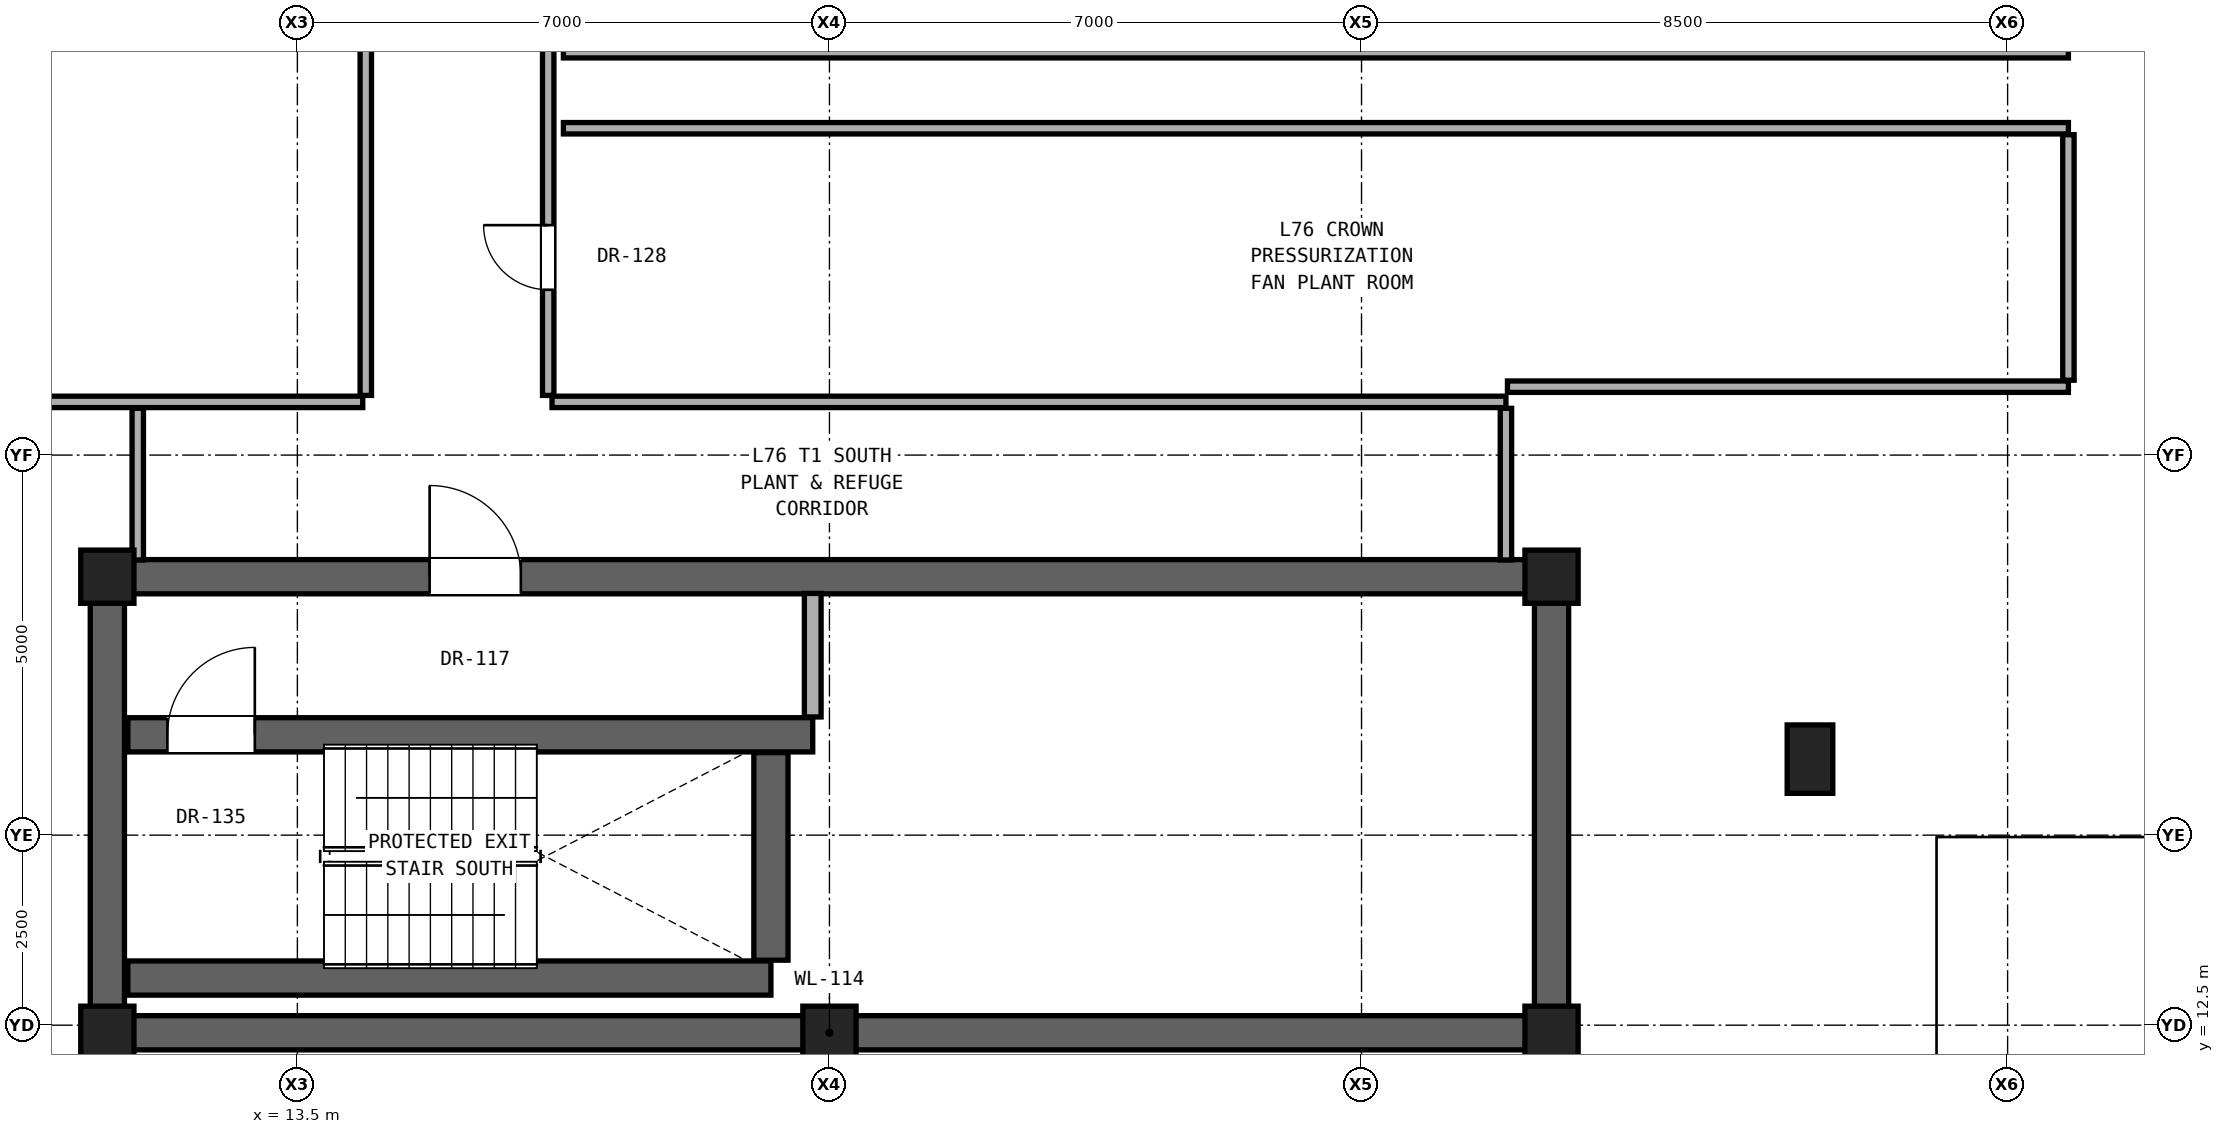
"""IFC4 building model, lengths in metres.
Left out: names, types, materials, properties, quantities, classifications, styles, units other than length and angle.
Written with IfcOpenShell. Run it as: python <this file> out.ifc"""

import sys

from ifc_helpers import new_model, si_unit, direction, frame, frame_2d, origin, origin_2d, place, context, subcontext, project, spatial, rectangle, extrude, element, fill, save


model = new_model("IFC4")
c1 = context("Model", 3, precision=1e-05, world=origin(), true_north=direction((0.0, 1.0)))
c2 = subcontext(c1, "Body", "Model", "MODEL_VIEW")
j1 = project(units=[si_unit("LENGTHUNIT", "METRE"), si_unit("PLANEANGLEUNIT", "RADIAN")], contexts=[c1])
p1 = place(None, origin())
s1 = spatial("IfcSite", under=j1, at=p1, CompositionType="ELEMENT")
p2 = place(p1, origin())
s2 = spatial("IfcBuilding", under=s1, at=p2, CompositionType="ELEMENT")
p3 = place(p2, frame((0.0, 0.0, 266.1)))
s3 = spatial("IfcBuildingStorey", under=s2, at=p3, CompositionType="ELEMENT", Elevation=266.1)
for number, where, z_axis, x_axis in (
    (1, (11.0, 12.4, 0.0), (0.0, 0.0, 1.0), (1.0, 0.0, 0.0)),
    (2, (20.5, 12.4, 0.0), (0.0, 0.0, 1.0), (1.0, 0.0, 0.0)),
    (3, (30.0, 12.4, 0.0), (0.0, 0.0, 1.0), (1.0, 0.0, 0.0)),
    (4, (11.0, 18.4, 0.0), (0.0, 0.0, 1.0), (1.0, 0.0, 0.0)),
    (5, (30.0, 18.4, 0.0), (0.0, 0.0, 1.0), (1.0, 0.0, 0.0)),
):
    element("IfcColumn", number, at=place(p3, frame(where, z_axis=z_axis, x_axis=x_axis)), inside=s3, PredefinedType="COLUMN", context=c2, shape_type="SweptSolid", body=[
        extrude(rectangle(XDim=0.7, YDim=0.7, at=origin_2d()), origin(), (0.0, 0.0, 1.0), 2.6),
    ])
p4 = place(p3, frame((33.4, 16.0, 0.0), z_axis=(0.0, 0.0, 1.0), x_axis=(1.0, 0.0, 0.0)))
e6 = element("IfcColumn", 6, at=p4, inside=s3, PredefinedType="PILASTER", context=c2, shape_type="SweptSolid", body=[
    extrude(rectangle(XDim=0.6, YDim=0.9, at=origin_2d()), origin(), (0.0, 0.0, 1.0), 2.6),
])
p5 = place(p3, frame((11.0, 12.4, 0.0), z_axis=(0.0, 0.0, 1.0), x_axis=(1.0, 0.0, 0.0)))
e7 = element("IfcWall", 7, at=p5, inside=s3, PredefinedType="SHEAR", context=c2, shape_type="SweptSolid", body=[
    extrude(rectangle(XDim=19.0, YDim=0.45, at=frame_2d((9.5, 0.0))), origin(), (0.0, 0.0, 1.0), 2.38),
])
for number, where, z_axis, x_axis in (
    (8, (11.0, 12.4, 0.0), (0.0, 0.0, 1.0), (0.0, 1.0, 0.0)),
    (9, (30.0, 12.4, 0.0), (0.0, 0.0, 1.0), (0.0, 1.0, 0.0)),
):
    element("IfcWall", number, at=place(p3, frame(where, z_axis=z_axis, x_axis=x_axis)), inside=s3, PredefinedType="SHEAR", context=c2, shape_type="SweptSolid", body=[
        extrude(rectangle(XDim=6.0, YDim=0.45, at=frame_2d((3.0, 0.0))), origin(), (0.0, 0.0, 1.0), 2.38),
    ])
p6 = place(p3, frame((11.0, 18.4, 0.0), z_axis=(0.0, 0.0, 1.0), x_axis=(1.0, 0.0, 0.0)))
e10 = element("IfcWall", 10, at=p6, inside=s3, PredefinedType="SHEAR", context=c2, shape_type="SweptSolid", body=[
    extrude(rectangle(XDim=19.0, YDim=0.45, at=frame_2d((9.5, 0.0))), origin(), (0.0, 0.0, 1.0), 2.38),
])
p7 = place(p6, frame((4.24, 0.0, 0.0)))
e11 = element("IfcOpeningElement", 11, at=p7, cuts=e10, PredefinedType="OPENING", context=c2, shape_type="SweptSolid", body=[
    extrude(rectangle(XDim=1.2, YDim=2.25, at=frame_2d((0.6, 1.125))), frame((0.0, 0.235, 0.0), z_axis=(0.0, -1.0, 0.0), x_axis=(1.0, 0.0, 0.0)), (0.0, 0.0, 1.0), 0.47),
])
p8 = place(p3, frame((11.27, 13.12, 0.0), z_axis=(0.0, 0.0, 1.0), x_axis=(1.0, 0.0, 0.0)))
e12 = element("IfcWall", 12, at=p8, inside=s3, PredefinedType="SHEAR", context=c2, shape_type="SweptSolid", body=[
    extrude(rectangle(XDim=8.46, YDim=0.45, at=frame_2d((4.23, 0.0))), origin(), (0.0, 0.0, 1.0), 2.38),
])
p9 = place(p3, frame((11.27, 16.32, 0.0), z_axis=(0.0, 0.0, 1.0), x_axis=(1.0, 0.0, 0.0)))
e13 = element("IfcWall", 13, at=p9, inside=s3, PredefinedType="SHEAR", context=c2, shape_type="SweptSolid", body=[
    extrude(rectangle(XDim=9.01, YDim=0.45, at=frame_2d((4.505, 0.0))), origin(), (0.0, 0.0, 1.0), 2.38),
])
p10 = place(p9, frame((0.52, 0.0, 0.0)))
e14 = element("IfcOpeningElement", 14, at=p10, cuts=e13, PredefinedType="OPENING", context=c2, shape_type="SweptSolid", body=[
    extrude(rectangle(XDim=1.15, YDim=2.2, at=frame_2d((0.575, 1.1))), frame((0.0, 0.235, 0.0), z_axis=(0.0, -1.0, 0.0), x_axis=(1.0, 0.0, 0.0)), (0.0, 0.0, 1.0), 0.47),
])
p11 = place(p3, frame((3.2, 20.7, 0.0), z_axis=(0.0, 0.0, 1.0), x_axis=(1.0, 0.0, 0.0)))
e15 = element("IfcWall", 15, at=p11, inside=s3, PredefinedType="PARTITIONING", context=c2, shape_type="SweptSolid", body=[
    extrude(rectangle(XDim=11.16, YDim=0.15, at=frame_2d((5.58, 0.0))), origin(), (0.0, 0.0, 1.0), 2.042),
])
p12 = place(p3, frame((16.85, 20.7, 0.0), z_axis=(0.0, 0.0, 1.0), x_axis=(1.0, 0.0, 0.0)))
e16 = element("IfcWall", 16, at=p12, inside=s3, PredefinedType="PARTITIONING", context=c2, shape_type="SweptSolid", body=[
    extrude(rectangle(XDim=12.55, YDim=0.15, at=frame_2d((6.275, 0.0))), origin(), (0.0, 0.0, 1.0), 2.042),
])
p13 = place(p3, frame((29.42, 20.9, 0.0), z_axis=(0.0, 0.0, 1.0), x_axis=(1.0, 0.0, 0.0)))
e17 = element("IfcWall", 17, at=p13, inside=s3, PredefinedType="PARTITIONING", context=c2, shape_type="SweptSolid", body=[
    extrude(rectangle(XDim=7.38, YDim=0.15, at=frame_2d((3.69, 0.0))), origin(), (0.0, 0.0, 1.0), 2.042),
])
for number, where, z_axis, x_axis in (
    (18, (17.0, 24.3, 0.0), (0.0, 0.0, 1.0), (1.0, 0.0, 0.0)),
    (19, (17.0, 25.3, 0.0), (0.0, 0.0, 1.0), (1.0, 0.0, 0.0)),
):
    element("IfcWall", number, at=place(p3, frame(where, z_axis=z_axis, x_axis=x_axis)), inside=s3, PredefinedType="PARTITIONING", context=c2, shape_type="SweptSolid", body=[
        extrude(rectangle(XDim=19.8, YDim=0.15, at=frame_2d((9.9, 0.0))), origin(), (0.0, 0.0, 1.0), 2.042),
    ])
p14 = place(p3, frame((11.4, 18.62, 0.0), z_axis=(0.0, 0.0, 1.0), x_axis=(0.0, 1.0, 0.0)))
e20 = element("IfcWall", 20, at=p14, inside=s3, PredefinedType="PARTITIONING", context=c2, shape_type="SweptSolid", body=[
    extrude(rectangle(XDim=1.995, YDim=0.15, at=frame_2d((0.998, 0.0))), origin(), (0.0, 0.0, 1.0), 2.38),
])
p15 = place(p3, frame((14.4, 20.785, 0.0), z_axis=(0.0, 0.0, 1.0), x_axis=(0.0, 1.0, 0.0)))
e21 = element("IfcWall", 21, at=p15, inside=s3, PredefinedType="PARTITIONING", context=c2, shape_type="SweptSolid", body=[
    extrude(rectangle(XDim=11.93, YDim=0.15, at=frame_2d((5.965, 0.0))), origin(), (0.0, 0.0, 1.0), 2.042),
])
p16 = place(p15, frame((5.54, 0.0, 0.0)))
e22 = element("IfcOpeningElement", 22, at=p16, cuts=e21, PredefinedType="OPENING", context=c2, shape_type="SweptSolid", body=[
    extrude(rectangle(XDim=0.85, YDim=2.01, at=frame_2d((0.425, 1.005))), frame((0.0, 0.085, 0.0), z_axis=(0.0, -1.0, 0.0), x_axis=(1.0, 0.0, 0.0)), (0.0, 0.0, 1.0), 0.17),
])
p17 = place(p3, frame((16.8, 20.785, 0.0), z_axis=(0.0, 0.0, 1.0), x_axis=(0.0, 1.0, 0.0)))
e23 = element("IfcWall", 23, at=p17, inside=s3, PredefinedType="PARTITIONING", context=c2, shape_type="SweptSolid", body=[
    extrude(rectangle(XDim=11.93, YDim=0.15, at=frame_2d((5.965, 0.0))), origin(), (0.0, 0.0, 1.0), 2.042),
])
p18 = place(p17, frame((6.79, 0.0, 0.0)))
e24 = element("IfcOpeningElement", 24, at=p18, cuts=e23, PredefinedType="OPENING", context=c2, shape_type="SweptSolid", body=[
    extrude(rectangle(XDim=0.85, YDim=2.01, at=frame_2d((0.425, 1.005))), frame((0.0, 0.085, 0.0), z_axis=(0.0, -1.0, 0.0), x_axis=(1.0, 0.0, 0.0)), (0.0, 0.0, 1.0), 0.17),
])
p19 = place(p17, frame((1.39, 0.0, 0.0)))
e25 = element("IfcOpeningElement", 25, at=p19, cuts=e23, PredefinedType="OPENING", context=c2, shape_type="SweptSolid", body=[
    extrude(rectangle(XDim=0.85, YDim=2.01, at=frame_2d((0.425, 1.005))), frame((0.0, 0.085, 0.0), z_axis=(0.0, -1.0, 0.0), x_axis=(1.0, 0.0, 0.0)), (0.0, 0.0, 1.0), 0.17),
])
p20 = place(p3, frame((19.73, 13.355, 0.0), z_axis=(0.0, 0.0, 1.0), x_axis=(0.0, 1.0, 0.0)))
e26 = element("IfcWall", 26, at=p20, inside=s3, PredefinedType="SHEAR", context=c2, shape_type="SweptSolid", body=[
    extrude(rectangle(XDim=2.73, YDim=0.45, at=frame_2d((1.365, 0.0))), origin(), (0.0, 0.0, 1.0), 2.38),
])
p21 = place(p3, frame((20.28, 16.555, 0.0), z_axis=(0.0, 0.0, 1.0), x_axis=(0.0, 1.0, 0.0)))
e27 = element("IfcWall", 27, at=p21, inside=s3, PredefinedType="SOLIDWALL", context=c2, shape_type="SweptSolid", body=[
    extrude(rectangle(XDim=1.625, YDim=0.22, at=frame_2d((0.812, 0.0))), origin(), (0.0, 0.0, 1.0), 2.38),
])
p22 = place(p3, frame((29.4, 18.62, 0.0), z_axis=(0.0, 0.0, 1.0), x_axis=(0.0, 1.0, 0.0)))
e28 = element("IfcWall", 28, at=p22, inside=s3, PredefinedType="PARTITIONING", context=c2, shape_type="SweptSolid", body=[
    extrude(rectangle(XDim=1.995, YDim=0.15, at=frame_2d((0.998, 0.0))), origin(), (0.0, 0.0, 1.0), 2.38),
])
p23 = place(p3, frame((36.8, 20.985, 0.0), z_axis=(0.0, 0.0, 1.0), x_axis=(0.0, 1.0, 0.0)))
e29 = element("IfcWall", 29, at=p23, inside=s3, PredefinedType="PARTITIONING", context=c2, shape_type="SweptSolid", body=[
    extrude(rectangle(XDim=3.23, YDim=0.15, at=frame_2d((1.615, 0.0))), origin(), (0.0, 0.0, 1.0), 2.38),
])
p24 = place(p7, origin())
e30 = element("IfcDoor", 30, at=p24, inside=s3, OperationType="SINGLE_SWING_LEFT", PredefinedType="DOOR", context=c2, shape_type="SweptSolid", body=[
    extrude(rectangle(XDim=1.2, YDim=2.25, at=frame_2d((0.6, 1.125))), frame((0.0, 0.025, 0.0), z_axis=(0.0, -1.0, 0.0), x_axis=(1.0, 0.0, 0.0)), (0.0, 0.0, 1.0), 0.05),
])
fill(e11, e30)
p25 = place(p10, origin())
e31 = element("IfcDoor", 31, at=p25, inside=s3, OperationType="SINGLE_SWING_RIGHT", PredefinedType="DOOR", context=c2, shape_type="SweptSolid", body=[
    extrude(rectangle(XDim=1.15, YDim=2.2, at=frame_2d((0.575, 1.1))), frame((0.0, 0.025, 0.0), z_axis=(0.0, -1.0, 0.0), x_axis=(1.0, 0.0, 0.0)), (0.0, 0.0, 1.0), 0.05),
])
fill(e14, e31)
p26 = place(p19, origin())
e32 = element("IfcDoor", 32, at=p26, inside=s3, OperationType="SINGLE_SWING_RIGHT", PredefinedType="DOOR", context=c2, shape_type="SweptSolid", body=[
    extrude(rectangle(XDim=0.85, YDim=2.01, at=frame_2d((0.425, 1.005))), frame((0.0, 0.025, 0.0), z_axis=(0.0, -1.0, 0.0), x_axis=(1.0, 0.0, 0.0)), (0.0, 0.0, 1.0), 0.05),
])
fill(e25, e32)
save(model, sys.argv[1])
